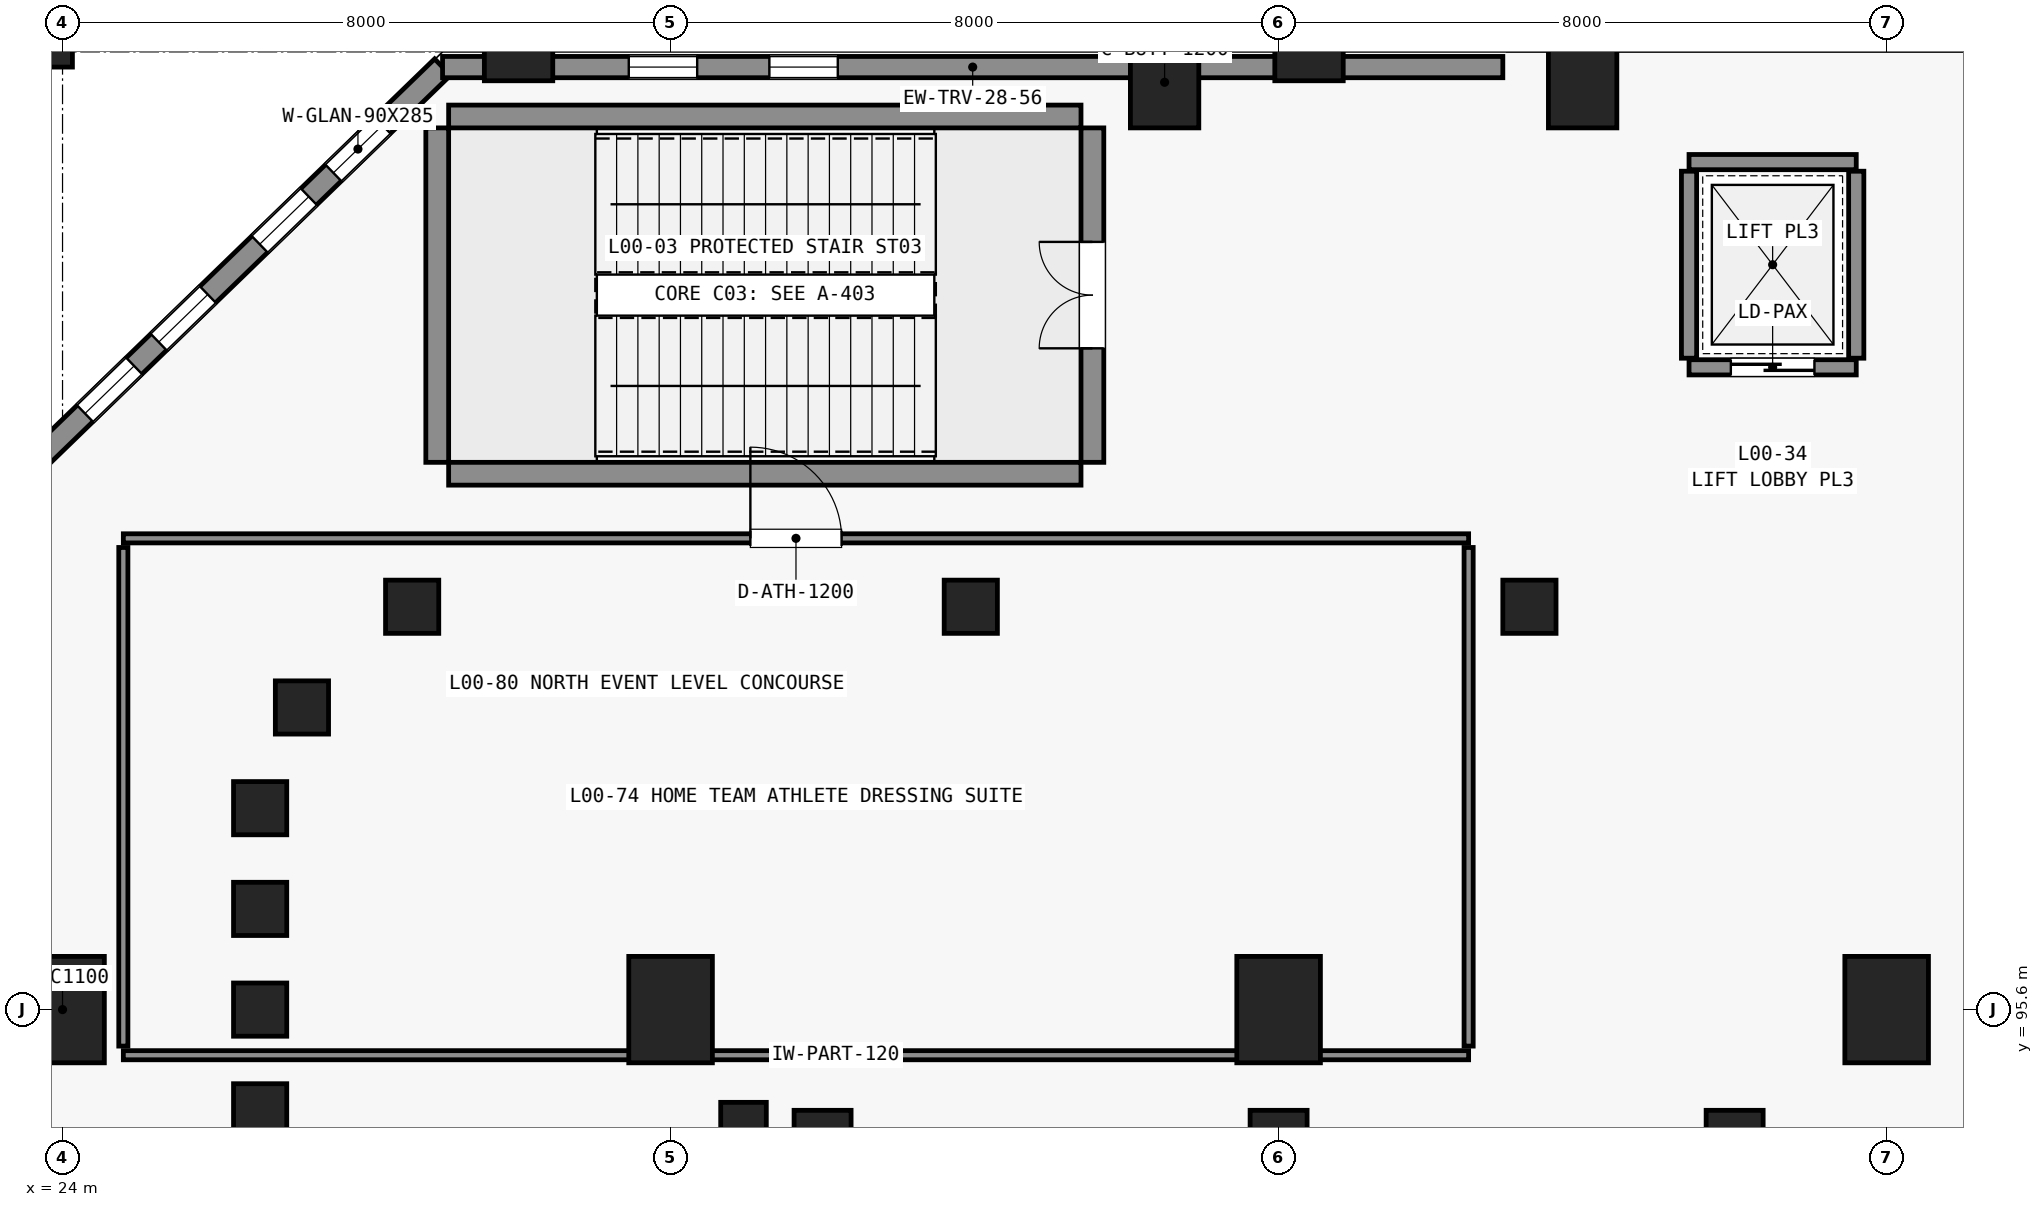
"""IFC4 building model, lengths in metres.
Left out: names, types, materials, properties, quantities, classifications, styles, units other than length and angle.
Written with IfcOpenShell. Run it as: python <this file> out.ifc"""

import sys

from ifc_helpers import new_model, si_unit, direction, frame, frame_2d, origin, origin_2d, place, context, subcontext, project, spatial, rectangle, extrude, element, fill, save


model = new_model("IFC4")
c1 = context("Model", 3, precision=1e-05, world=origin(), true_north=direction((0.0, 1.0)))
c2 = subcontext(c1, "Body", "Model", "MODEL_VIEW")
j1 = project(units=[si_unit("LENGTHUNIT", "METRE"), si_unit("PLANEANGLEUNIT", "RADIAN")], contexts=[c1])
p1 = place(None, origin())
s1 = spatial("IfcSite", under=j1, at=p1, CompositionType="ELEMENT")
p2 = place(p1, origin())
s2 = spatial("IfcBuilding", under=s1, at=p2, CompositionType="ELEMENT")
p3 = place(p2, origin())
s3 = spatial("IfcBuildingStorey", under=s2, at=p3, CompositionType="ELEMENT", Elevation=0.0)
for number, where, z_axis, x_axis in (
    (1, (24.0, 95.6, 0.0), (0.0, 0.0, 1.0), (1.0, 0.0, 0.0)),
    (2, (32.0, 95.6, 0.0), (0.0, 0.0, 1.0), (1.0, 0.0, 0.0)),
    (3, (40.0, 95.6, 0.0), (0.0, 0.0, 1.0), (1.0, 0.0, 0.0)),
    (4, (48.0, 95.6, 0.0), (0.0, 0.0, 1.0), (1.0, 0.0, 0.0)),
):
    element("IfcColumn", number, at=place(p3, frame(where, z_axis=z_axis, x_axis=x_axis)), inside=s3, PredefinedType="COLUMN", context=c2, shape_type="SweptSolid", body=[
        extrude(rectangle(XDim=1.1, YDim=1.4, at=origin_2d()), origin(), (0.0, 0.0, 1.0), 6.0),
    ])
for number, where, z_axis, x_axis in (
    (5, (38.5, 107.8, 0.0), (0.0, 0.0, 1.0), (1.0, 0.0, 0.0)),
    (6, (44.0, 107.8, 0.0), (0.0, 0.0, 1.0), (1.0, 0.0, 0.0)),
    (7, (23.68, 108.6, 0.0), (0.0, 0.0, 1.0), (1.0, 0.0, 0.0)),
    (8, (30.0, 108.42, 0.0), (0.0, 0.0, 1.0), (1.0, 0.0, 0.0)),
    (9, (40.4, 108.42, 0.0), (0.0, 0.0, 1.0), (1.0, 0.0, 0.0)),
):
    element("IfcColumn", number, at=place(p3, frame(where, z_axis=z_axis, x_axis=x_axis)), inside=s3, PredefinedType="PILASTER", context=c2, shape_type="SweptSolid", body=[
        extrude(rectangle(XDim=0.9, YDim=1.2, at=origin_2d()), origin(), (0.0, 0.0, 1.0), 6.0),
    ])
for number, where, z_axis, x_axis in (
    (10, (29.08, 102.65, 0.0), (0.0, 0.0, 1.0), (1.0, 0.0, 0.0)),
    (11, (29.08, 107.35, 0.0), (0.0, 0.0, 1.0), (1.0, 0.0, 0.0)),
):
    element("IfcWall", number, at=place(p3, frame(where, z_axis=z_axis, x_axis=x_axis)), inside=s3, PredefinedType="SHEAR", context=c2, shape_type="SweptSolid", body=[
        extrude(rectangle(XDim=8.32, YDim=0.3, at=frame_2d((4.16, 0.0))), origin(), (0.0, 0.0, 1.0), 6.0),
    ])
p4 = place(p3, frame((28.93, 102.8, 0.0), z_axis=(0.0, 0.0, 1.0), x_axis=(0.0, 1.0, 0.0)))
e12 = element("IfcWall", 12, at=p4, inside=s3, PredefinedType="SHEAR", context=c2, shape_type="SweptSolid", body=[
    extrude(rectangle(XDim=4.4, YDim=0.3, at=frame_2d((2.2, 0.0))), origin(), (0.0, 0.0, 1.0), 6.0),
])
p5 = place(p3, frame((37.55, 102.8, 0.0), z_axis=(0.0, 0.0, 1.0), x_axis=(0.0, 1.0, 0.0)))
e13 = element("IfcWall", 13, at=p5, inside=s3, PredefinedType="SHEAR", context=c2, shape_type="SweptSolid", body=[
    extrude(rectangle(XDim=4.4, YDim=0.3, at=frame_2d((2.2, 0.0))), origin(), (0.0, 0.0, 1.0), 6.0),
])
p6 = place(p5, frame((1.5, 0.0, 0.0)))
e14 = element("IfcOpeningElement", 14, at=p6, cuts=e13, PredefinedType="OPENING", context=c2, shape_type="SweptSolid", body=[
    extrude(rectangle(XDim=1.4, YDim=2.2, at=frame_2d((0.7, 1.1))), frame((0.0, 0.16, 0.0), z_axis=(0.0, -1.0, 0.0), x_axis=(1.0, 0.0, 0.0)), (0.0, 0.0, 1.0), 0.32),
])
p7 = place(p3, frame((46.0, 93.9, 0.0), z_axis=(0.0, 0.0, 1.0), x_axis=(1.0, 0.0, 0.0)))
e15 = element("IfcColumn", 15, at=p7, inside=s3, PredefinedType="COLUMN", context=c2, shape_type="SweptSolid", body=[
    extrude(rectangle(XDim=0.75, YDim=0.75, at=origin_2d()), origin(), (0.0, 0.0, 1.0), 6.0),
])
p8 = place(p3, frame((43.3, 100.9, 0.0), z_axis=(0.0, 0.0, 1.0), x_axis=(1.0, 0.0, 0.0)))
e16 = element("IfcColumn", 16, at=p8, inside=s3, PredefinedType="COLUMN", context=c2, shape_type="SweptSolid", body=[
    extrude(rectangle(XDim=0.7, YDim=0.7, at=origin_2d()), origin(), (0.0, 0.0, 1.0), 6.0),
])
p9 = place(p3, frame((40.0, 93.9, 0.0), z_axis=(0.0, 0.0, 1.0), x_axis=(1.0, 0.0, 0.0)))
e17 = element("IfcColumn", 17, at=p9, inside=s3, PredefinedType="COLUMN", context=c2, shape_type="SweptSolid", body=[
    extrude(rectangle(XDim=0.75, YDim=0.75, at=origin_2d()), origin(), (0.0, 0.0, 1.0), 6.0),
])
p10 = place(p3, frame((35.95, 100.9, 0.0), z_axis=(0.0, 0.0, 1.0), x_axis=(1.0, 0.0, 0.0)))
e18 = element("IfcColumn", 18, at=p10, inside=s3, PredefinedType="COLUMN", context=c2, shape_type="SweptSolid", body=[
    extrude(rectangle(XDim=0.7, YDim=0.7, at=origin_2d()), origin(), (0.0, 0.0, 1.0), 6.0),
])
p11 = place(p3, frame((34.0, 93.9, 0.0), z_axis=(0.0, 0.0, 1.0), x_axis=(1.0, 0.0, 0.0)))
e19 = element("IfcColumn", 19, at=p11, inside=s3, PredefinedType="COLUMN", context=c2, shape_type="SweptSolid", body=[
    extrude(rectangle(XDim=0.75, YDim=0.75, at=origin_2d()), origin(), (0.0, 0.0, 1.0), 6.0),
])
for number, where, z_axis, x_axis in (
    (20, (28.6, 100.9, 0.0), (0.0, 0.0, 1.0), (1.0, 0.0, 0.0)),
    (21, (27.15, 99.575, 0.0), (0.0, 0.0, 1.0), (1.0, 0.0, 0.0)),
    (22, (26.6, 98.25, 0.0), (0.0, 0.0, 1.0), (1.0, 0.0, 0.0)),
    (23, (26.6, 96.925, 0.0), (0.0, 0.0, 1.0), (1.0, 0.0, 0.0)),
    (24, (26.6, 95.6, 0.0), (0.0, 0.0, 1.0), (1.0, 0.0, 0.0)),
    (25, (26.6, 94.275, 0.0), (0.0, 0.0, 1.0), (1.0, 0.0, 0.0)),
):
    element("IfcColumn", number, at=place(p3, frame(where, z_axis=z_axis, x_axis=x_axis)), inside=s3, PredefinedType="COLUMN", context=c2, shape_type="SweptSolid", body=[
        extrude(rectangle(XDim=0.7, YDim=0.7, at=origin_2d()), origin(), (0.0, 0.0, 1.0), 6.0),
    ])
p12 = place(p3, frame((32.96, 94.08, 0.0), z_axis=(0.0, 0.0, 1.0), x_axis=(1.0, 0.0, 0.0)))
e26 = element("IfcColumn", 26, at=p12, inside=s3, PredefinedType="COLUMN", context=c2, shape_type="SweptSolid", body=[
    extrude(rectangle(XDim=0.6, YDim=0.6, at=origin_2d()), origin(), (0.0, 0.0, 1.0), 6.0),
])
p13 = place(p3, frame((45.4, 104.05, 0.0), z_axis=(0.0, 0.0, 1.0), x_axis=(1.0, 0.0, 0.0)))
e27 = element("IfcWall", 27, at=p13, inside=s3, PredefinedType="STANDARD", context=c2, shape_type="SweptSolid", body=[
    extrude(rectangle(XDim=2.2, YDim=0.2, at=frame_2d((1.1, 0.0))), origin(), (0.0, 0.0, 1.0), 5.64),
])
p14 = place(p13, frame((0.55, 0.0, 0.0)))
e28 = element("IfcOpeningElement", 28, at=p14, cuts=e27, PredefinedType="OPENING", context=c2, shape_type="SweptSolid", body=[
    extrude(rectangle(XDim=1.1, YDim=2.15, at=frame_2d((0.55, 1.075))), frame((0.0, 0.11, 0.0), z_axis=(0.0, -1.0, 0.0), x_axis=(1.0, 0.0, 0.0)), (0.0, 0.0, 1.0), 0.22),
])
p15 = place(p3, frame((45.4, 106.75, 0.0), z_axis=(0.0, 0.0, 1.0), x_axis=(1.0, 0.0, 0.0)))
e29 = element("IfcWall", 29, at=p15, inside=s3, PredefinedType="STANDARD", context=c2, shape_type="SweptSolid", body=[
    extrude(rectangle(XDim=2.2, YDim=0.2, at=frame_2d((1.1, 0.0))), origin(), (0.0, 0.0, 1.0), 5.64),
])
for number, where, z_axis, x_axis in (
    (30, (45.4, 104.17, 0.0), (0.0, 0.0, 1.0), (0.0, 1.0, 0.0)),
    (31, (47.6, 104.17, 0.0), (0.0, 0.0, 1.0), (0.0, 1.0, 0.0)),
):
    element("IfcWall", number, at=place(p3, frame(where, z_axis=z_axis, x_axis=x_axis)), inside=s3, PredefinedType="STANDARD", context=c2, shape_type="SweptSolid", body=[
        extrude(rectangle(XDim=2.46, YDim=0.2, at=frame_2d((1.23, 0.0))), origin(), (0.0, 0.0, 1.0), 5.64),
    ])
p16 = place(p3, frame((29.0, 108.0, 0.0), z_axis=(0.0, 0.0, 1.0), x_axis=(-0.718244287729, -0.695791019736, 0.0)))
e32 = element("IfcWall", 32, at=p16, inside=s3, PredefinedType="STANDARD", context=c2, shape_type="SweptSolid", body=[
    extrude(rectangle(XDim=17.821, YDim=0.3, at=frame_2d((8.911, 0.0))), origin(), (0.0, 0.0, 1.0), 4.79),
])
p17 = place(p16, frame((1.1, 0.0, 0.95)))
e33 = element("IfcOpeningElement", 33, at=p17, cuts=e32, PredefinedType="OPENING", context=c2, shape_type="SweptSolid", body=[
    extrude(rectangle(XDim=0.9, YDim=2.85, at=frame_2d((0.45, 1.425))), frame((0.0, 0.16, 0.0), z_axis=(0.0, -1.0, 0.0), x_axis=(1.0, 0.0, 0.0)), (0.0, 0.0, 1.0), 0.32),
])
p18 = place(p16, frame((2.45, 0.0, 0.95)))
e34 = element("IfcOpeningElement", 34, at=p18, cuts=e32, PredefinedType="OPENING", context=c2, shape_type="SweptSolid", body=[
    extrude(rectangle(XDim=0.9, YDim=2.85, at=frame_2d((0.45, 1.425))), frame((0.0, 0.16, 0.0), z_axis=(0.0, -1.0, 0.0), x_axis=(1.0, 0.0, 0.0)), (0.0, 0.0, 1.0), 0.32),
])
p19 = place(p16, frame((4.3, 0.0, 0.95)))
e35 = element("IfcOpeningElement", 35, at=p19, cuts=e32, PredefinedType="OPENING", context=c2, shape_type="SweptSolid", body=[
    extrude(rectangle(XDim=0.9, YDim=2.85, at=frame_2d((0.45, 1.425))), frame((0.0, 0.16, 0.0), z_axis=(0.0, -1.0, 0.0), x_axis=(1.0, 0.0, 0.0)), (0.0, 0.0, 1.0), 0.32),
])
p20 = place(p16, frame((5.65, 0.0, 0.95)))
e36 = element("IfcOpeningElement", 36, at=p20, cuts=e32, PredefinedType="OPENING", context=c2, shape_type="SweptSolid", body=[
    extrude(rectangle(XDim=0.9, YDim=2.85, at=frame_2d((0.45, 1.425))), frame((0.0, 0.16, 0.0), z_axis=(0.0, -1.0, 0.0), x_axis=(1.0, 0.0, 0.0)), (0.0, 0.0, 1.0), 0.32),
])
p21 = place(p16, frame((7.5, 0.0, 0.95)))
e37 = element("IfcOpeningElement", 37, at=p21, cuts=e32, PredefinedType="OPENING", context=c2, shape_type="SweptSolid", body=[
    extrude(rectangle(XDim=0.9, YDim=2.85, at=frame_2d((0.45, 1.425))), frame((0.0, 0.16, 0.0), z_axis=(0.0, -1.0, 0.0), x_axis=(1.0, 0.0, 0.0)), (0.0, 0.0, 1.0), 0.32),
])
p22 = place(p16, frame((8.85, 0.0, 0.95)))
e38 = element("IfcOpeningElement", 38, at=p22, cuts=e32, PredefinedType="OPENING", context=c2, shape_type="SweptSolid", body=[
    extrude(rectangle(XDim=0.9, YDim=2.85, at=frame_2d((0.45, 1.425))), frame((0.0, 0.16, 0.0), z_axis=(0.0, -1.0, 0.0), x_axis=(1.0, 0.0, 0.0)), (0.0, 0.0, 1.0), 0.32),
])
p23 = place(p16, frame((10.7, 0.0, 0.95)))
e39 = element("IfcOpeningElement", 39, at=p23, cuts=e32, PredefinedType="OPENING", context=c2, shape_type="SweptSolid", body=[
    extrude(rectangle(XDim=0.9, YDim=2.85, at=frame_2d((0.45, 1.425))), frame((0.0, 0.16, 0.0), z_axis=(0.0, -1.0, 0.0), x_axis=(1.0, 0.0, 0.0)), (0.0, 0.0, 1.0), 0.32),
])
p24 = place(p16, frame((12.05, 0.0, 0.95)))
e40 = element("IfcOpeningElement", 40, at=p24, cuts=e32, PredefinedType="OPENING", context=c2, shape_type="SweptSolid", body=[
    extrude(rectangle(XDim=0.9, YDim=2.85, at=frame_2d((0.45, 1.425))), frame((0.0, 0.16, 0.0), z_axis=(0.0, -1.0, 0.0), x_axis=(1.0, 0.0, 0.0)), (0.0, 0.0, 1.0), 0.32),
])
p25 = place(p16, frame((13.9, 0.0, 0.95)))
e41 = element("IfcOpeningElement", 41, at=p25, cuts=e32, PredefinedType="OPENING", context=c2, shape_type="SweptSolid", body=[
    extrude(rectangle(XDim=0.9, YDim=2.85, at=frame_2d((0.45, 1.425))), frame((0.0, 0.16, 0.0), z_axis=(0.0, -1.0, 0.0), x_axis=(1.0, 0.0, 0.0)), (0.0, 0.0, 1.0), 0.32),
])
p26 = place(p16, frame((15.25, 0.0, 0.95)))
e42 = element("IfcOpeningElement", 42, at=p26, cuts=e32, PredefinedType="OPENING", context=c2, shape_type="SweptSolid", body=[
    extrude(rectangle(XDim=0.9, YDim=2.85, at=frame_2d((0.45, 1.425))), frame((0.0, 0.16, 0.0), z_axis=(0.0, -1.0, 0.0), x_axis=(1.0, 0.0, 0.0)), (0.0, 0.0, 1.0), 0.32),
])
p27 = place(p3, frame((29.0, 108.0, 0.0), z_axis=(0.0, 0.0, 1.0), x_axis=(1.0, 0.0, 0.0)))
e43 = element("IfcWall", 43, at=p27, inside=s3, PredefinedType="STANDARD", context=c2, shape_type="SweptSolid", body=[
    extrude(rectangle(XDim=13.95, YDim=0.28, at=frame_2d((6.975, 0.0))), origin(), (0.0, 0.0, 1.0), 5.64),
])
p28 = place(p27, frame((2.45, 0.0, 0.95)))
e44 = element("IfcOpeningElement", 44, at=p28, cuts=e43, PredefinedType="OPENING", context=c2, shape_type="SweptSolid", body=[
    extrude(rectangle(XDim=0.9, YDim=2.85, at=frame_2d((0.45, 1.425))), frame((0.0, 0.15, 0.0), z_axis=(0.0, -1.0, 0.0), x_axis=(1.0, 0.0, 0.0)), (0.0, 0.0, 1.0), 0.3),
])
p29 = place(p27, frame((4.3, 0.0, 0.95)))
e45 = element("IfcOpeningElement", 45, at=p29, cuts=e43, PredefinedType="OPENING", context=c2, shape_type="SweptSolid", body=[
    extrude(rectangle(XDim=0.9, YDim=2.85, at=frame_2d((0.45, 1.425))), frame((0.0, 0.15, 0.0), z_axis=(0.0, -1.0, 0.0), x_axis=(1.0, 0.0, 0.0)), (0.0, 0.0, 1.0), 0.3),
])
p30 = place(p3, frame((24.8, 95.0, 0.0), z_axis=(0.0, 0.0, 1.0), x_axis=(1.0, 0.0, 0.0)))
e46 = element("IfcWall", 46, at=p30, inside=s3, PredefinedType="PARTITIONING", context=c2, shape_type="SweptSolid", body=[
    extrude(rectangle(XDim=17.7, YDim=0.12, at=frame_2d((8.85, 0.0))), origin(), (0.0, 0.0, 1.0), 4.79),
])
p31 = place(p3, frame((24.8, 101.8, 0.0), z_axis=(0.0, 0.0, 1.0), x_axis=(1.0, 0.0, 0.0)))
e47 = element("IfcWall", 47, at=p31, inside=s3, PredefinedType="PARTITIONING", context=c2, shape_type="SweptSolid", body=[
    extrude(rectangle(XDim=17.7, YDim=0.12, at=frame_2d((8.85, 0.0))), origin(), (0.0, 0.0, 1.0), 5.64),
])
p32 = place(p31, frame((8.25, 0.0, 0.0)))
e48 = element("IfcOpeningElement", 48, at=p32, cuts=e47, PredefinedType="OPENING", context=c2, shape_type="SweptSolid", body=[
    extrude(rectangle(XDim=1.2, YDim=2.2, at=frame_2d((0.6, 1.1))), frame((0.0, 0.07, 0.0), z_axis=(0.0, -1.0, 0.0), x_axis=(1.0, 0.0, 0.0)), (0.0, 0.0, 1.0), 0.14),
])
for number, where, z_axis, x_axis in (
    (49, (24.8, 95.12, 0.0), (0.0, 0.0, 1.0), (0.0, 1.0, 0.0)),
    (50, (42.5, 95.12, 0.0), (0.0, 0.0, 1.0), (0.0, 1.0, 0.0)),
):
    element("IfcWall", number, at=place(p3, frame(where, z_axis=z_axis, x_axis=x_axis)), inside=s3, PredefinedType="PARTITIONING", context=c2, shape_type="SweptSolid", body=[
        extrude(rectangle(XDim=6.56, YDim=0.12, at=frame_2d((3.28, 0.0))), origin(), (0.0, 0.0, 1.0), 4.79),
    ])
p33 = place(p14, origin())
e51 = element("IfcDoor", 51, at=p33, inside=s3, OperationType="SLIDING_TO_LEFT", PredefinedType="DOOR", context=c2, shape_type="SweptSolid", body=[
    extrude(rectangle(XDim=1.1, YDim=2.15, at=frame_2d((0.55, 1.075))), frame((0.0, 0.025, 0.0), z_axis=(0.0, -1.0, 0.0), x_axis=(1.0, 0.0, 0.0)), (0.0, 0.0, 1.0), 0.05),
])
fill(e28, e51)
p34 = place(p17, origin())
e52 = element("IfcWindow", 52, at=p34, inside=s3, PartitioningType="DOUBLE_PANEL_VERTICAL", PredefinedType="WINDOW", context=c2, shape_type="SweptSolid", body=[
    extrude(rectangle(XDim=0.9, YDim=2.85, at=frame_2d((0.45, 1.425))), frame((0.0, 0.03, 0.0), z_axis=(0.0, -1.0, 0.0), x_axis=(1.0, 0.0, 0.0)), (0.0, 0.0, 1.0), 0.06),
])
fill(e33, e52)
p35 = place(p18, origin())
e53 = element("IfcWindow", 53, at=p35, inside=s3, PartitioningType="DOUBLE_PANEL_VERTICAL", PredefinedType="WINDOW", context=c2, shape_type="SweptSolid", body=[
    extrude(rectangle(XDim=0.9, YDim=2.85, at=frame_2d((0.45, 1.425))), frame((0.0, 0.03, 0.0), z_axis=(0.0, -1.0, 0.0), x_axis=(1.0, 0.0, 0.0)), (0.0, 0.0, 1.0), 0.06),
])
fill(e34, e53)
p36 = place(p19, origin())
e54 = element("IfcWindow", 54, at=p36, inside=s3, PartitioningType="DOUBLE_PANEL_VERTICAL", PredefinedType="WINDOW", context=c2, shape_type="SweptSolid", body=[
    extrude(rectangle(XDim=0.9, YDim=2.85, at=frame_2d((0.45, 1.425))), frame((0.0, 0.03, 0.0), z_axis=(0.0, -1.0, 0.0), x_axis=(1.0, 0.0, 0.0)), (0.0, 0.0, 1.0), 0.06),
])
fill(e35, e54)
p37 = place(p20, origin())
e55 = element("IfcWindow", 55, at=p37, inside=s3, PartitioningType="DOUBLE_PANEL_VERTICAL", PredefinedType="WINDOW", context=c2, shape_type="SweptSolid", body=[
    extrude(rectangle(XDim=0.9, YDim=2.85, at=frame_2d((0.45, 1.425))), frame((0.0, 0.03, 0.0), z_axis=(0.0, -1.0, 0.0), x_axis=(1.0, 0.0, 0.0)), (0.0, 0.0, 1.0), 0.06),
])
fill(e36, e55)
p38 = place(p28, origin())
e56 = element("IfcWindow", 56, at=p38, inside=s3, PartitioningType="DOUBLE_PANEL_VERTICAL", PredefinedType="WINDOW", context=c2, shape_type="SweptSolid", body=[
    extrude(rectangle(XDim=0.9, YDim=2.85, at=frame_2d((0.45, 1.425))), frame((0.0, 0.03, 0.0), z_axis=(0.0, -1.0, 0.0), x_axis=(1.0, 0.0, 0.0)), (0.0, 0.0, 1.0), 0.06),
])
fill(e44, e56)
p39 = place(p29, origin())
e57 = element("IfcWindow", 57, at=p39, inside=s3, PartitioningType="DOUBLE_PANEL_VERTICAL", PredefinedType="WINDOW", context=c2, shape_type="SweptSolid", body=[
    extrude(rectangle(XDim=0.9, YDim=2.85, at=frame_2d((0.45, 1.425))), frame((0.0, 0.03, 0.0), z_axis=(0.0, -1.0, 0.0), x_axis=(1.0, 0.0, 0.0)), (0.0, 0.0, 1.0), 0.06),
])
fill(e45, e57)
p40 = place(p6, origin())
e58 = element("IfcDoor", 58, at=p40, inside=s3, OperationType="DOUBLE_DOOR_SINGLE_SWING", PredefinedType="DOOR", context=c2, shape_type="SweptSolid", body=[
    extrude(rectangle(XDim=1.4, YDim=2.2, at=frame_2d((0.7, 1.1))), frame((0.0, 0.025, 0.0), z_axis=(0.0, -1.0, 0.0), x_axis=(1.0, 0.0, 0.0)), (0.0, 0.0, 1.0), 0.05),
])
fill(e14, e58)
p41 = place(p32, origin())
e59 = element("IfcDoor", 59, at=p41, inside=s3, OperationType="SINGLE_SWING_LEFT", PredefinedType="DOOR", context=c2, shape_type="SweptSolid", body=[
    extrude(rectangle(XDim=1.2, YDim=2.2, at=frame_2d((0.6, 1.1))), frame((0.0, 0.025, 0.0), z_axis=(0.0, -1.0, 0.0), x_axis=(1.0, 0.0, 0.0)), (0.0, 0.0, 1.0), 0.05),
])
fill(e48, e59)
save(model, sys.argv[1])
